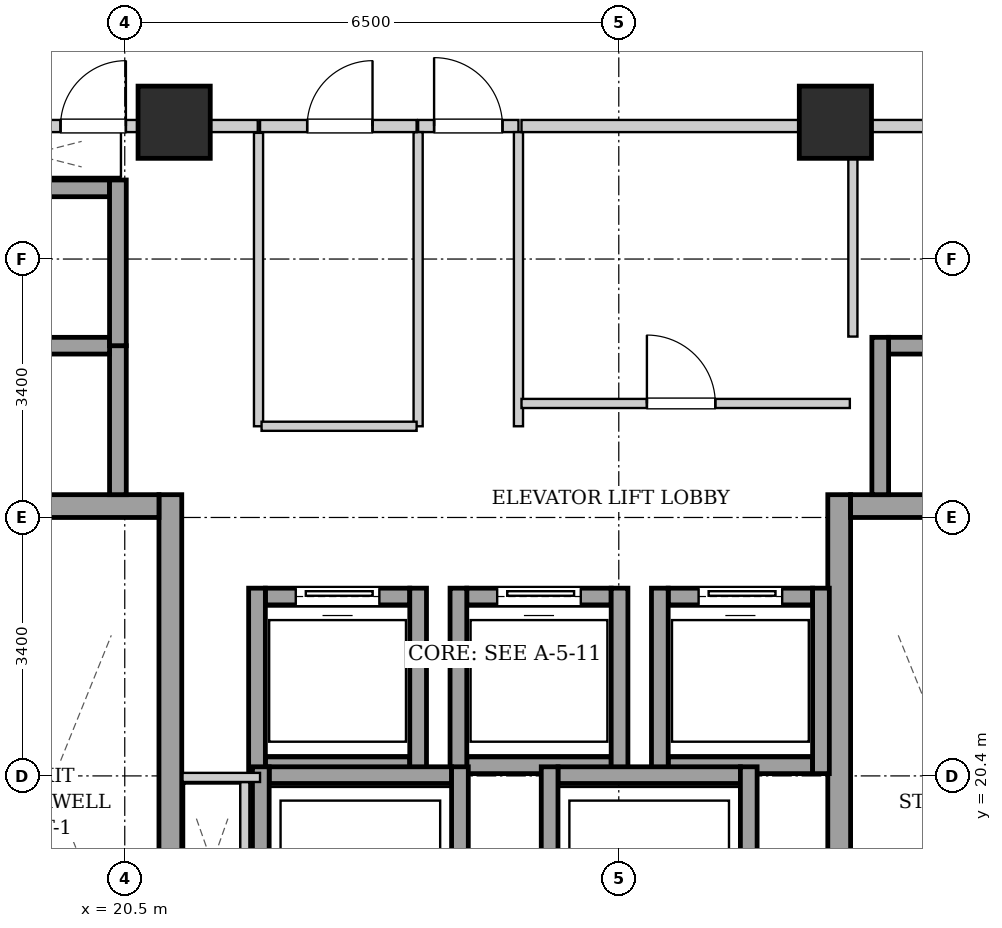
"""IFC4 building model, lengths in metres.
Left out: names, types, materials, properties, quantities, classifications, styles, units other than length and angle.
Written with IfcOpenShell. Run it as: python <this file> out.ifc"""

import sys

from ifc_helpers import new_model, si_unit, direction, frame, frame_2d, origin, origin_2d, place, context, subcontext, project, spatial, rectangle, extrude, element, fill, save


model = new_model("IFC4")
c1 = context("Model", 3, precision=1e-05, world=origin(), true_north=direction((0.0, 1.0)))
c2 = subcontext(c1, "Body", "Model", "MODEL_VIEW")
j1 = project(units=[si_unit("LENGTHUNIT", "METRE"), si_unit("PLANEANGLEUNIT", "RADIAN")], contexts=[c1])
p1 = place(None, origin())
s1 = spatial("IfcSite", under=j1, at=p1, CompositionType="ELEMENT")
p2 = place(p1, origin())
s2 = spatial("IfcBuilding", under=s1, at=p2, CompositionType="ELEMENT")
p3 = place(p2, frame((0.0, 0.0, 147.15)))
s3 = spatial("IfcBuildingStorey", under=s2, at=p3, CompositionType="ELEMENT", Elevation=147.15)
for number, where, z_axis, x_axis in (
    (1, (21.15, 29.0, 0.0), (0.0, 0.0, 1.0), (1.0, 0.0, 0.0)),
    (2, (29.85, 29.0, 0.0), (0.0, 0.0, 1.0), (1.0, 0.0, 0.0)),
):
    element("IfcColumn", number, at=place(p3, frame(where, z_axis=z_axis, x_axis=x_axis)), inside=s3, PredefinedType="COLUMN", context=c2, shape_type="SweptSolid", body=[
        extrude(rectangle(XDim=0.95, YDim=0.95, at=origin_2d()), origin(), (0.0, 0.0, 1.0), 3.25),
    ])
p4 = place(p3, frame((21.1, 15.1, 0.0), z_axis=(0.0, 0.0, 1.0), x_axis=(0.0, 1.0, 0.0)))
e3 = element("IfcWall", 3, at=p4, inside=s3, PredefinedType="SHEAR", context=c2, shape_type="SweptSolid", body=[
    extrude(rectangle(XDim=9.0, YDim=0.3, at=frame_2d((4.5, 0.0))), origin(), (0.0, 0.0, 1.0), 2.99),
])
p5 = place(p3, frame((18.1, 23.95, 0.0), z_axis=(0.0, 0.0, 1.0), x_axis=(1.0, 0.0, 0.0)))
e4 = element("IfcWall", 4, at=p5, inside=s3, PredefinedType="SHEAR", context=c2, shape_type="SweptSolid", body=[
    extrude(rectangle(XDim=2.85, YDim=0.3, at=frame_2d((1.425, 0.0))), origin(), (0.0, 0.0, 1.0), 2.99),
])
p6 = place(p3, frame((29.9, 15.1, 0.0), z_axis=(0.0, 0.0, 1.0), x_axis=(0.0, 1.0, 0.0)))
e5 = element("IfcWall", 5, at=p6, inside=s3, PredefinedType="SHEAR", context=c2, shape_type="SweptSolid", body=[
    extrude(rectangle(XDim=9.0, YDim=0.3, at=frame_2d((4.5, 0.0))), origin(), (0.0, 0.0, 1.0), 2.99),
])
p7 = place(p3, frame((30.05, 23.95, 0.0), z_axis=(0.0, 0.0, 1.0), x_axis=(1.0, 0.0, 0.0)))
e6 = element("IfcWall", 6, at=p7, inside=s3, PredefinedType="SHEAR", context=c2, shape_type="SweptSolid", body=[
    extrude(rectangle(XDim=2.85, YDim=0.3, at=frame_2d((1.425, 0.0))), origin(), (0.0, 0.0, 1.0), 2.99),
])
p8 = place(p3, frame((22.35, 20.54, 0.0), z_axis=(0.0, 0.0, 1.0), x_axis=(1.0, 0.0, 0.0)))
e7 = element("IfcWall", 7, at=p8, inside=s3, PredefinedType="SHEAR", context=c2, shape_type="SweptSolid", body=[
    extrude(rectangle(XDim=1.9, YDim=0.22, at=frame_2d((0.95, 0.0))), origin(), (0.0, 0.0, 1.0), 2.99),
])
p9 = place(p3, frame((22.35, 22.76, 0.0), z_axis=(0.0, 0.0, 1.0), x_axis=(1.0, 0.0, 0.0)))
e8 = element("IfcWall", 8, at=p9, inside=s3, PredefinedType="SHEAR", context=c2, shape_type="SweptSolid", body=[
    extrude(rectangle(XDim=1.9, YDim=0.22, at=frame_2d((0.95, 0.0))), origin(), (0.0, 0.0, 1.0), 2.99),
])
p10 = place(p9, frame((0.4, 0.0, 0.0)))
e9 = element("IfcOpeningElement", 9, at=p10, cuts=e8, PredefinedType="OPENING", context=c2, shape_type="SweptSolid", body=[
    extrude(rectangle(XDim=1.1, YDim=2.15, at=frame_2d((0.55, 1.075))), frame((0.0, 0.12, 0.0), z_axis=(0.0, -1.0, 0.0), x_axis=(1.0, 0.0, 0.0)), (0.0, 0.0, 1.0), 0.24),
])
for number, where, z_axis, x_axis in (
    (10, (22.24, 20.43, 0.0), (0.0, 0.0, 1.0), (0.0, 1.0, 0.0)),
    (11, (24.36, 20.43, 0.0), (0.0, 0.0, 1.0), (0.0, 1.0, 0.0)),
):
    element("IfcWall", number, at=place(p3, frame(where, z_axis=z_axis, x_axis=x_axis)), inside=s3, PredefinedType="SHEAR", context=c2, shape_type="SweptSolid", body=[
        extrude(rectangle(XDim=2.44, YDim=0.22, at=frame_2d((1.22, 0.0))), origin(), (0.0, 0.0, 1.0), 2.99),
    ])
p11 = place(p3, frame((25.0, 20.54, 0.0), z_axis=(0.0, 0.0, 1.0), x_axis=(1.0, 0.0, 0.0)))
e12 = element("IfcWall", 12, at=p11, inside=s3, PredefinedType="SHEAR", context=c2, shape_type="SweptSolid", body=[
    extrude(rectangle(XDim=1.9, YDim=0.22, at=frame_2d((0.95, 0.0))), origin(), (0.0, 0.0, 1.0), 2.99),
])
p12 = place(p3, frame((25.0, 22.76, 0.0), z_axis=(0.0, 0.0, 1.0), x_axis=(1.0, 0.0, 0.0)))
e13 = element("IfcWall", 13, at=p12, inside=s3, PredefinedType="SHEAR", context=c2, shape_type="SweptSolid", body=[
    extrude(rectangle(XDim=1.9, YDim=0.22, at=frame_2d((0.95, 0.0))), origin(), (0.0, 0.0, 1.0), 2.99),
])
p13 = place(p12, frame((0.4, 0.0, 0.0)))
e14 = element("IfcOpeningElement", 14, at=p13, cuts=e13, PredefinedType="OPENING", context=c2, shape_type="SweptSolid", body=[
    extrude(rectangle(XDim=1.1, YDim=2.15, at=frame_2d((0.55, 1.075))), frame((0.0, 0.12, 0.0), z_axis=(0.0, -1.0, 0.0), x_axis=(1.0, 0.0, 0.0)), (0.0, 0.0, 1.0), 0.24),
])
for number, where, z_axis, x_axis in (
    (15, (24.89, 20.43, 0.0), (0.0, 0.0, 1.0), (0.0, 1.0, 0.0)),
    (16, (27.01, 20.43, 0.0), (0.0, 0.0, 1.0), (0.0, 1.0, 0.0)),
):
    element("IfcWall", number, at=place(p3, frame(where, z_axis=z_axis, x_axis=x_axis)), inside=s3, PredefinedType="SHEAR", context=c2, shape_type="SweptSolid", body=[
        extrude(rectangle(XDim=2.44, YDim=0.22, at=frame_2d((1.22, 0.0))), origin(), (0.0, 0.0, 1.0), 2.99),
    ])
p14 = place(p3, frame((27.65, 20.54, 0.0), z_axis=(0.0, 0.0, 1.0), x_axis=(1.0, 0.0, 0.0)))
e17 = element("IfcWall", 17, at=p14, inside=s3, PredefinedType="SHEAR", context=c2, shape_type="SweptSolid", body=[
    extrude(rectangle(XDim=1.9, YDim=0.22, at=frame_2d((0.95, 0.0))), origin(), (0.0, 0.0, 1.0), 2.99),
])
p15 = place(p3, frame((27.65, 22.76, 0.0), z_axis=(0.0, 0.0, 1.0), x_axis=(1.0, 0.0, 0.0)))
e18 = element("IfcWall", 18, at=p15, inside=s3, PredefinedType="SHEAR", context=c2, shape_type="SweptSolid", body=[
    extrude(rectangle(XDim=1.9, YDim=0.22, at=frame_2d((0.95, 0.0))), origin(), (0.0, 0.0, 1.0), 2.99),
])
p16 = place(p15, frame((0.4, 0.0, 0.0)))
e19 = element("IfcOpeningElement", 19, at=p16, cuts=e18, PredefinedType="OPENING", context=c2, shape_type="SweptSolid", body=[
    extrude(rectangle(XDim=1.1, YDim=2.15, at=frame_2d((0.55, 1.075))), frame((0.0, 0.12, 0.0), z_axis=(0.0, -1.0, 0.0), x_axis=(1.0, 0.0, 0.0)), (0.0, 0.0, 1.0), 0.24),
])
for number, where, z_axis, x_axis in (
    (20, (27.54, 20.43, 0.0), (0.0, 0.0, 1.0), (0.0, 1.0, 0.0)),
    (21, (29.66, 20.43, 0.0), (0.0, 0.0, 1.0), (0.0, 1.0, 0.0)),
):
    element("IfcWall", number, at=place(p3, frame(where, z_axis=z_axis, x_axis=x_axis)), inside=s3, PredefinedType="SHEAR", context=c2, shape_type="SweptSolid", body=[
        extrude(rectangle(XDim=2.44, YDim=0.22, at=frame_2d((1.22, 0.0))), origin(), (0.0, 0.0, 1.0), 2.99),
    ])
p17 = place(p3, frame((20.41, 24.1, 0.0), z_axis=(0.0, 0.0, 1.0), x_axis=(0.0, 1.0, 0.0)))
e22 = element("IfcWall", 22, at=p17, inside=s3, PredefinedType="SHEAR", context=c2, shape_type="SweptSolid", body=[
    extrude(rectangle(XDim=1.96, YDim=0.22, at=frame_2d((0.98, 0.0))), origin(), (0.0, 0.0, 1.0), 2.99),
])
for number, where, z_axis, x_axis in (
    (23, (18.4, 26.06, 0.0), (0.0, 0.0, 1.0), (1.0, 0.0, 0.0)),
    (24, (18.4, 28.13, 0.0), (0.0, 0.0, 1.0), (1.0, 0.0, 0.0)),
):
    element("IfcWall", number, at=place(p3, frame(where, z_axis=z_axis, x_axis=x_axis)), inside=s3, PredefinedType="SHEAR", context=c2, shape_type="SweptSolid", body=[
        extrude(rectangle(XDim=1.9, YDim=0.22, at=frame_2d((0.95, 0.0))), origin(), (0.0, 0.0, 1.0), 2.99),
    ])
p18 = place(p3, frame((20.41, 26.06, 0.0), z_axis=(0.0, 0.0, 1.0), x_axis=(0.0, 1.0, 0.0)))
e25 = element("IfcWall", 25, at=p18, inside=s3, PredefinedType="SHEAR", context=c2, shape_type="SweptSolid", body=[
    extrude(rectangle(XDim=2.18, YDim=0.22, at=frame_2d((1.09, 0.0))), origin(), (0.0, 0.0, 1.0), 2.99),
])
p19 = place(p3, frame((30.55, 26.06, 0.0), z_axis=(0.0, 0.0, 1.0), x_axis=(1.0, 0.0, 0.0)))
e26 = element("IfcWall", 26, at=p19, inside=s3, PredefinedType="SHEAR", context=c2, shape_type="SweptSolid", body=[
    extrude(rectangle(XDim=1.9, YDim=0.22, at=frame_2d((0.95, 0.0))), origin(), (0.0, 0.0, 1.0), 2.99),
])
p20 = place(p3, frame((30.44, 24.1, 0.0), z_axis=(0.0, 0.0, 1.0), x_axis=(0.0, 1.0, 0.0)))
e27 = element("IfcWall", 27, at=p20, inside=s3, PredefinedType="SHEAR", context=c2, shape_type="SweptSolid", body=[
    extrude(rectangle(XDim=2.07, YDim=0.22, at=frame_2d((1.035, 0.0))), origin(), (0.0, 0.0, 1.0), 2.99),
])
p21 = place(p3, frame((22.4, 20.41, 0.0), z_axis=(0.0, 0.0, 1.0), x_axis=(1.0, 0.0, 0.0)))
e28 = element("IfcWall", 28, at=p21, inside=s3, PredefinedType="SHEAR", context=c2, shape_type="SweptSolid", body=[
    extrude(rectangle(XDim=2.4, YDim=0.22, at=frame_2d((1.2, 0.0))), origin(), (0.0, 0.0, 1.0), 2.99),
])
for number, where, z_axis, x_axis in (
    (29, (22.29, 17.98, 0.0), (0.0, 0.0, 1.0), (0.0, 1.0, 0.0)),
    (30, (24.91, 17.98, 0.0), (0.0, 0.0, 1.0), (0.0, 1.0, 0.0)),
):
    element("IfcWall", number, at=place(p3, frame(where, z_axis=z_axis, x_axis=x_axis)), inside=s3, PredefinedType="SHEAR", context=c2, shape_type="SweptSolid", body=[
        extrude(rectangle(XDim=2.54, YDim=0.22, at=frame_2d((1.27, 0.0))), origin(), (0.0, 0.0, 1.0), 2.99),
    ])
p22 = place(p3, frame((26.2, 20.41, 0.0), z_axis=(0.0, 0.0, 1.0), x_axis=(1.0, 0.0, 0.0)))
e31 = element("IfcWall", 31, at=p22, inside=s3, PredefinedType="SHEAR", context=c2, shape_type="SweptSolid", body=[
    extrude(rectangle(XDim=2.4, YDim=0.22, at=frame_2d((1.2, 0.0))), origin(), (0.0, 0.0, 1.0), 2.99),
])
for number, where, z_axis, x_axis in (
    (32, (26.09, 17.98, 0.0), (0.0, 0.0, 1.0), (0.0, 1.0, 0.0)),
    (33, (28.71, 17.98, 0.0), (0.0, 0.0, 1.0), (0.0, 1.0, 0.0)),
):
    element("IfcWall", number, at=place(p3, frame(where, z_axis=z_axis, x_axis=x_axis)), inside=s3, PredefinedType="SHEAR", context=c2, shape_type="SweptSolid", body=[
        extrude(rectangle(XDim=2.54, YDim=0.22, at=frame_2d((1.27, 0.0))), origin(), (0.0, 0.0, 1.0), 2.99),
    ])
p23 = place(p3, frame((24.36, 28.95, 0.0), z_axis=(0.0, 0.0, 1.0), x_axis=(1.0, 0.0, 0.0)))
e34 = element("IfcWall", 34, at=p23, inside=s3, PredefinedType="PARTITIONING", context=c2, shape_type="SweptSolid", body=[
    extrude(rectangle(XDim=1.32, YDim=0.16, at=frame_2d((0.66, 0.0))), origin(), (0.0, 0.0, 1.0), 2.442),
])
p24 = place(p23, frame((0.21, 0.0, 0.0)))
e35 = element("IfcOpeningElement", 35, at=p24, cuts=e34, PredefinedType="OPENING", context=c2, shape_type="SweptSolid", body=[
    extrude(rectangle(XDim=0.9, YDim=2.05, at=frame_2d((0.45, 1.025))), frame((0.0, 0.09, 0.0), z_axis=(0.0, -1.0, 0.0), x_axis=(1.0, 0.0, 0.0)), (0.0, 0.0, 1.0), 0.18),
])
p25 = place(p3, frame((17.96, 28.95, 0.0), z_axis=(0.0, 0.0, 1.0), x_axis=(1.0, 0.0, 0.0)))
e36 = element("IfcWall", 36, at=p25, inside=s3, PredefinedType="PARTITIONING", context=c2, shape_type="SweptSolid", body=[
    extrude(rectangle(XDim=4.29, YDim=0.16, at=frame_2d((2.145, 0.0))), origin(), (0.0, 0.0, 1.0), 2.442),
])
p26 = place(p25, frame((1.695, 0.0, 0.0)))
e37 = element("IfcOpeningElement", 37, at=p26, cuts=e36, PredefinedType="OPENING", context=c2, shape_type="SweptSolid", body=[
    extrude(rectangle(XDim=0.86, YDim=2.05, at=frame_2d((0.43, 1.025))), frame((0.0, 0.09, 0.0), z_axis=(0.0, -1.0, 0.0), x_axis=(1.0, 0.0, 0.0)), (0.0, 0.0, 1.0), 0.18),
])
p27 = place(p3, frame((22.08, 18.2, 0.0), z_axis=(0.0, 0.0, 1.0), x_axis=(0.0, 1.0, 0.0)))
e38 = element("IfcWall", 38, at=p27, inside=s3, PredefinedType="PARTITIONING", context=c2, shape_type="SweptSolid", body=[
    extrude(rectangle(XDim=2.12, YDim=0.12, at=frame_2d((1.06, 0.0))), origin(), (0.0, 0.0, 1.0), 2.99),
])
p28 = place(p3, frame((22.28, 20.38, 0.0), z_axis=(0.0, 0.0, 1.0), x_axis=(-1.0, 0.0, 0.0)))
e39 = element("IfcWall", 39, at=p28, inside=s3, PredefinedType="PARTITIONING", context=c2, shape_type="SweptSolid", body=[
    extrude(rectangle(XDim=1.02, YDim=0.12, at=frame_2d((0.51, 0.0))), origin(), (0.0, 0.0, 1.0), 2.99),
])
for number, where, z_axis, x_axis in (
    (40, (24.36, 25.0, 0.0), (0.0, 0.0, 1.0), (0.0, 1.0, 0.0)),
    (41, (25.68, 25.0, 0.0), (0.0, 0.0, 1.0), (0.0, 1.0, 0.0)),
):
    element("IfcWall", number, at=place(p3, frame(where, z_axis=z_axis, x_axis=x_axis)), inside=s3, PredefinedType="PARTITIONING", context=c2, shape_type="SweptSolid", body=[
        extrude(rectangle(XDim=3.87, YDim=0.12, at=frame_2d((1.935, 0.0))), origin(), (0.0, 0.0, 1.0), 2.99),
    ])
p29 = place(p3, frame((30.08, 26.18, 0.0), z_axis=(0.0, 0.0, 1.0), x_axis=(0.0, 1.0, 0.0)))
e42 = element("IfcWall", 42, at=p29, inside=s3, PredefinedType="PARTITIONING", context=c2, shape_type="SweptSolid", body=[
    extrude(rectangle(XDim=2.68, YDim=0.12, at=frame_2d((1.34, 0.0))), origin(), (0.0, 0.0, 1.0), 2.99),
])
p30 = place(p3, frame((30.08, 28.95, 0.0), z_axis=(0.0, 0.0, 1.0), x_axis=(1.0, 0.0, 0.0)))
e43 = element("IfcWall", 43, at=p30, inside=s3, PredefinedType="PARTITIONING", context=c2, shape_type="SweptSolid", body=[
    extrude(rectangle(XDim=2.96, YDim=0.16, at=frame_2d((1.48, 0.0))), origin(), (0.0, 0.0, 1.0), 2.99),
])
p31 = place(p30, frame((1.045, 0.0, 0.0)))
e44 = element("IfcOpeningElement", 44, at=p31, cuts=e43, PredefinedType="OPENING", context=c2, shape_type="SweptSolid", body=[
    extrude(rectangle(XDim=0.86, YDim=2.05, at=frame_2d((0.43, 1.025))), frame((0.0, 0.09, 0.0), z_axis=(0.0, -1.0, 0.0), x_axis=(1.0, 0.0, 0.0)), (0.0, 0.0, 1.0), 0.18),
])
p32 = place(p3, frame((22.26, 25.0, 0.0), z_axis=(0.0, 0.0, 1.0), x_axis=(0.0, 1.0, 0.0)))
e45 = element("IfcWall", 45, at=p32, inside=s3, PredefinedType="PARTITIONING", context=c2, shape_type="SweptSolid", body=[
    extrude(rectangle(XDim=3.86, YDim=0.12, at=frame_2d((1.93, 0.0))), origin(), (0.0, 0.0, 1.0), 2.99),
])
p33 = place(p3, frame((22.3, 25.0, 0.0), z_axis=(0.0, 0.0, 1.0), x_axis=(1.0, 0.0, 0.0)))
e46 = element("IfcWall", 46, at=p33, inside=s3, PredefinedType="PARTITIONING", context=c2, shape_type="SweptSolid", body=[
    extrude(rectangle(XDim=2.04, YDim=0.12, at=frame_2d((1.02, 0.0))), origin(), (0.0, 0.0, 1.0), 2.99),
])
p34 = place(p3, frame((22.28, 28.95, 0.0), z_axis=(0.0, 0.0, 1.0), x_axis=(1.0, 0.0, 0.0)))
e47 = element("IfcWall", 47, at=p34, inside=s3, PredefinedType="PARTITIONING", context=c2, shape_type="SweptSolid", body=[
    extrude(rectangle(XDim=2.06, YDim=0.16, at=frame_2d((1.03, 0.0))), origin(), (0.0, 0.0, 1.0), 2.442),
])
p35 = place(p34, frame((0.62, 0.0, 0.0)))
e48 = element("IfcOpeningElement", 48, at=p35, cuts=e47, PredefinedType="OPENING", context=c2, shape_type="SweptSolid", body=[
    extrude(rectangle(XDim=0.86, YDim=2.05, at=frame_2d((0.43, 1.025))), frame((0.0, 0.09, 0.0), z_axis=(0.0, -1.0, 0.0), x_axis=(1.0, 0.0, 0.0)), (0.0, 0.0, 1.0), 0.18),
])
p36 = place(p3, frame((25.72, 28.95, 0.0), z_axis=(0.0, 0.0, 1.0), x_axis=(1.0, 0.0, 0.0)))
e49 = element("IfcWall", 49, at=p36, inside=s3, PredefinedType="PARTITIONING", context=c2, shape_type="SweptSolid", body=[
    extrude(rectangle(XDim=4.32, YDim=0.16, at=frame_2d((2.16, 0.0))), origin(), (0.0, 0.0, 1.0), 2.442),
])
p37 = place(p3, frame((25.72, 25.3, 0.0), z_axis=(0.0, 0.0, 1.0), x_axis=(1.0, 0.0, 0.0)))
e50 = element("IfcWall", 50, at=p37, inside=s3, PredefinedType="PARTITIONING", context=c2, shape_type="SweptSolid", body=[
    extrude(rectangle(XDim=4.32, YDim=0.12, at=frame_2d((2.16, 0.0))), origin(), (0.0, 0.0, 1.0), 2.99),
])
p38 = place(p37, frame((1.65, 0.0, 0.0)))
e51 = element("IfcOpeningElement", 51, at=p38, cuts=e50, PredefinedType="OPENING", context=c2, shape_type="SweptSolid", body=[
    extrude(rectangle(XDim=0.9, YDim=2.05, at=frame_2d((0.45, 1.025))), frame((0.0, 0.07, 0.0), z_axis=(0.0, -1.0, 0.0), x_axis=(1.0, 0.0, 0.0)), (0.0, 0.0, 1.0), 0.14),
])
p39 = place(p10, origin())
e52 = element("IfcDoor", 52, at=p39, inside=s3, OperationType="SLIDING_TO_LEFT", PredefinedType="DOOR", context=c2, shape_type="SweptSolid", body=[
    extrude(rectangle(XDim=1.1, YDim=2.15, at=frame_2d((0.55, 1.075))), frame((0.0, 0.025, 0.0), z_axis=(0.0, -1.0, 0.0), x_axis=(1.0, 0.0, 0.0)), (0.0, 0.0, 1.0), 0.05),
])
fill(e9, e52)
p40 = place(p13, origin())
e53 = element("IfcDoor", 53, at=p40, inside=s3, OperationType="SLIDING_TO_LEFT", PredefinedType="DOOR", context=c2, shape_type="SweptSolid", body=[
    extrude(rectangle(XDim=1.1, YDim=2.15, at=frame_2d((0.55, 1.075))), frame((0.0, 0.025, 0.0), z_axis=(0.0, -1.0, 0.0), x_axis=(1.0, 0.0, 0.0)), (0.0, 0.0, 1.0), 0.05),
])
fill(e14, e53)
p41 = place(p16, origin())
e54 = element("IfcDoor", 54, at=p41, inside=s3, OperationType="SLIDING_TO_LEFT", PredefinedType="DOOR", context=c2, shape_type="SweptSolid", body=[
    extrude(rectangle(XDim=1.1, YDim=2.15, at=frame_2d((0.55, 1.075))), frame((0.0, 0.025, 0.0), z_axis=(0.0, -1.0, 0.0), x_axis=(1.0, 0.0, 0.0)), (0.0, 0.0, 1.0), 0.05),
])
fill(e19, e54)
p42 = place(p24, origin())
e55 = element("IfcDoor", 55, at=p42, inside=s3, OperationType="SINGLE_SWING_LEFT", PredefinedType="DOOR", context=c2, shape_type="SweptSolid", body=[
    extrude(rectangle(XDim=0.9, YDim=2.05, at=frame_2d((0.45, 1.025))), frame((0.0, 0.025, 0.0), z_axis=(0.0, -1.0, 0.0), x_axis=(1.0, 0.0, 0.0)), (0.0, 0.0, 1.0), 0.05),
])
fill(e35, e55)
p43 = place(p26, origin())
e56 = element("IfcDoor", 56, at=p43, inside=s3, OperationType="SINGLE_SWING_RIGHT", PredefinedType="DOOR", context=c2, shape_type="SweptSolid", body=[
    extrude(rectangle(XDim=0.86, YDim=2.05, at=frame_2d((0.43, 1.025))), frame((0.0, 0.025, 0.0), z_axis=(0.0, -1.0, 0.0), x_axis=(1.0, 0.0, 0.0)), (0.0, 0.0, 1.0), 0.05),
])
fill(e37, e56)
p44 = place(p35, origin())
e57 = element("IfcDoor", 57, at=p44, inside=s3, OperationType="SINGLE_SWING_RIGHT", PredefinedType="DOOR", context=c2, shape_type="SweptSolid", body=[
    extrude(rectangle(XDim=0.86, YDim=2.05, at=frame_2d((0.43, 1.025))), frame((0.0, 0.025, 0.0), z_axis=(0.0, -1.0, 0.0), x_axis=(1.0, 0.0, 0.0)), (0.0, 0.0, 1.0), 0.05),
])
fill(e48, e57)
p45 = place(p38, origin())
e58 = element("IfcDoor", 58, at=p45, inside=s3, OperationType="SINGLE_SWING_LEFT", PredefinedType="DOOR", context=c2, shape_type="SweptSolid", body=[
    extrude(rectangle(XDim=0.9, YDim=2.05, at=frame_2d((0.45, 1.025))), frame((0.0, 0.025, 0.0), z_axis=(0.0, -1.0, 0.0), x_axis=(1.0, 0.0, 0.0)), (0.0, 0.0, 1.0), 0.05),
])
fill(e51, e58)
save(model, sys.argv[1])
